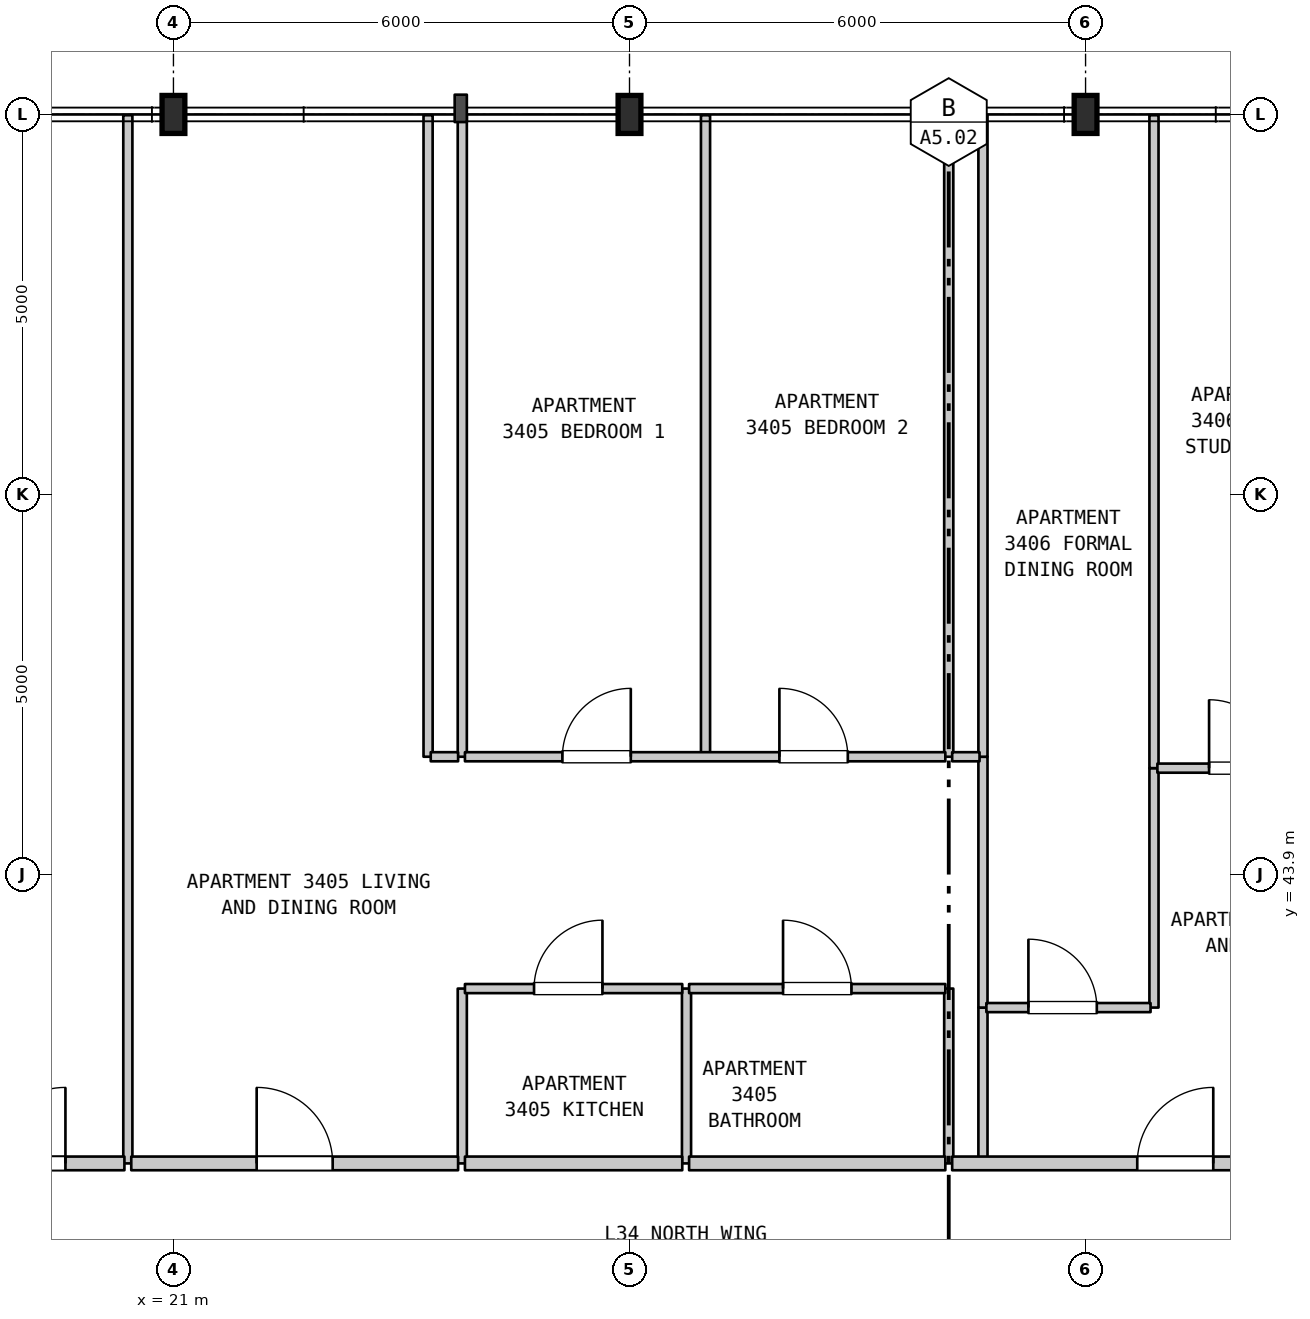
"""IFC4 building model, lengths in metres.
Left out: names, types, materials, properties, quantities, classifications, styles, units other than length and angle.
Written with IfcOpenShell. Run it as: python <this file> out.ifc"""

import sys

from ifc_helpers import new_model, si_unit, direction, frame, frame_2d, origin, origin_2d, place, context, subcontext, project, spatial, rectangle, i_section, extrude, element, fill, save


model = new_model("IFC4")
c1 = context("Model", 3, precision=1e-05, world=origin(), true_north=direction((0.0, 1.0)))
c2 = subcontext(c1, "Body", "Model", "MODEL_VIEW")
j1 = project(units=[si_unit("LENGTHUNIT", "METRE"), si_unit("PLANEANGLEUNIT", "RADIAN")], contexts=[c1])
p1 = place(None, origin())
s1 = spatial("IfcSite", under=j1, at=p1, CompositionType="ELEMENT")
p2 = place(p1, origin())
s2 = spatial("IfcBuilding", under=s1, at=p2, CompositionType="ELEMENT")
p3 = place(p2, frame((0.0, 0.0, 140.9)))
s3 = spatial("IfcBuildingStorey", under=s2, at=p3, CompositionType="ELEMENT", Elevation=140.9)
for number, where, z_axis, x_axis in (
    (1, (21.0, 53.9, 0.0), (0.0, 0.0, 1.0), (1.0, 0.0, 0.0)),
    (2, (27.0, 53.9, 0.0), (0.0, 0.0, 1.0), (1.0, 0.0, 0.0)),
    (3, (33.0, 53.9, 0.0), (0.0, 0.0, 1.0), (1.0, 0.0, 0.0)),
):
    element("IfcColumn", number, at=place(p3, frame(where, z_axis=z_axis, x_axis=x_axis)), inside=s3, PredefinedType="COLUMN", context=c2, shape_type="SweptSolid", body=[
        extrude(i_section(OverallWidth=0.3, OverallDepth=0.5, WebThickness=0.014, FlangeThickness=0.028, FilletRadius=0.027, at=origin_2d()), origin(), (0.0, 0.0, 1.0), 3.7),
    ])
p4 = place(p3, frame((20.4, 40.1, 0.0), z_axis=(0.0, 0.0, 1.0), x_axis=(0.0, 1.0, 0.0)))
e4 = element("IfcWall", 4, at=p4, inside=s3, PredefinedType="PARTITIONING", context=c2, shape_type="SweptSolid", body=[
    extrude(rectangle(XDim=13.79, YDim=0.12, at=frame_2d((6.895, 0.0))), origin(), (0.0, 0.0, 1.0), 3.385),
])
p5 = place(p3, frame((24.35, 45.45, 0.0), z_axis=(0.0, 0.0, 1.0), x_axis=(0.0, 1.0, 0.0)))
e5 = element("IfcWall", 5, at=p5, inside=s3, PredefinedType="PARTITIONING", context=c2, shape_type="SweptSolid", body=[
    extrude(rectangle(XDim=8.44, YDim=0.12, at=frame_2d((4.22, 0.0))), origin(), (0.0, 0.0, 1.0), 3.385),
])
p6 = place(p3, frame((24.8, 40.1, 0.0), z_axis=(0.0, 0.0, 1.0), x_axis=(0.0, 1.0, 0.0)))
e6 = element("IfcWall", 6, at=p6, inside=s3, PredefinedType="PARTITIONING", context=c2, shape_type="SweptSolid", body=[
    extrude(rectangle(XDim=2.3, YDim=0.12, at=frame_2d((1.15, 0.0))), origin(), (0.0, 0.0, 1.0), 3.385),
])
p7 = place(p3, frame((24.8, 45.45, 0.0), z_axis=(0.0, 0.0, 1.0), x_axis=(0.0, 1.0, 0.0)))
e7 = element("IfcWall", 7, at=p7, inside=s3, PredefinedType="PARTITIONING", context=c2, shape_type="SweptSolid", body=[
    extrude(rectangle(XDim=8.44, YDim=0.12, at=frame_2d((4.22, 0.0))), origin(), (0.0, 0.0, 1.0), 3.385),
])
p8 = place(p3, frame((27.75, 40.1, 0.0), z_axis=(0.0, 0.0, 1.0), x_axis=(0.0, 1.0, 0.0)))
e8 = element("IfcWall", 8, at=p8, inside=s3, PredefinedType="PARTITIONING", context=c2, shape_type="SweptSolid", body=[
    extrude(rectangle(XDim=2.3, YDim=0.12, at=frame_2d((1.15, 0.0))), origin(), (0.0, 0.0, 1.0), 3.385),
])
p9 = place(p3, frame((28.0, 45.45, 0.0), z_axis=(0.0, 0.0, 1.0), x_axis=(0.0, 1.0, 0.0)))
e9 = element("IfcWall", 9, at=p9, inside=s3, PredefinedType="PARTITIONING", context=c2, shape_type="SweptSolid", body=[
    extrude(rectangle(XDim=8.44, YDim=0.12, at=frame_2d((4.22, 0.0))), origin(), (0.0, 0.0, 1.0), 3.385),
])
p10 = place(p3, frame((31.2, 40.1, 0.0), z_axis=(0.0, 0.0, 1.0), x_axis=(0.0, 1.0, 0.0)))
e10 = element("IfcWall", 10, at=p10, inside=s3, PredefinedType="PARTITIONING", context=c2, shape_type="SweptSolid", body=[
    extrude(rectangle(XDim=2.3, YDim=0.12, at=frame_2d((1.15, 0.0))), origin(), (0.0, 0.0, 1.0), 3.385),
])
p11 = place(p3, frame((31.2, 45.45, 0.0), z_axis=(0.0, 0.0, 1.0), x_axis=(0.0, 1.0, 0.0)))
e11 = element("IfcWall", 11, at=p11, inside=s3, PredefinedType="PARTITIONING", context=c2, shape_type="SweptSolid", body=[
    extrude(rectangle(XDim=8.44, YDim=0.12, at=frame_2d((4.22, 0.0))), origin(), (0.0, 0.0, 1.0), 3.385),
])
p12 = place(p3, frame((31.65, 40.1, 0.0), z_axis=(0.0, 0.0, 1.0), x_axis=(0.0, 1.0, 0.0)))
e12 = element("IfcWall", 12, at=p12, inside=s3, PredefinedType="PARTITIONING", context=c2, shape_type="SweptSolid", body=[
    extrude(rectangle(XDim=2.05, YDim=0.12, at=frame_2d((1.025, 0.0))), origin(), (0.0, 0.0, 1.0), 3.385),
])
p13 = place(p3, frame((31.65, 42.15, 0.0), z_axis=(0.0, 0.0, 1.0), x_axis=(0.0, 1.0, 0.0)))
e13 = element("IfcWall", 13, at=p13, inside=s3, PredefinedType="PARTITIONING", context=c2, shape_type="SweptSolid", body=[
    extrude(rectangle(XDim=3.3, YDim=0.12, at=frame_2d((1.65, 0.0))), origin(), (0.0, 0.0, 1.0), 3.385),
])
p14 = place(p3, frame((31.65, 45.45, 0.0), z_axis=(0.0, 0.0, 1.0), x_axis=(0.0, 1.0, 0.0)))
e14 = element("IfcWall", 14, at=p14, inside=s3, PredefinedType="PARTITIONING", context=c2, shape_type="SweptSolid", body=[
    extrude(rectangle(XDim=8.44, YDim=0.12, at=frame_2d((4.22, 0.0))), origin(), (0.0, 0.0, 1.0), 3.385),
])
p15 = place(p3, frame((33.9, 42.15, 0.0), z_axis=(0.0, 0.0, 1.0), x_axis=(0.0, 1.0, 0.0)))
e15 = element("IfcWall", 15, at=p15, inside=s3, PredefinedType="PARTITIONING", context=c2, shape_type="SweptSolid", body=[
    extrude(rectangle(XDim=3.15, YDim=0.12, at=frame_2d((1.575, 0.0))), origin(), (0.0, 0.0, 1.0), 3.385),
])
p16 = place(p3, frame((33.9, 45.3, 0.0), z_axis=(0.0, 0.0, 1.0), x_axis=(0.0, 1.0, 0.0)))
e16 = element("IfcWall", 16, at=p16, inside=s3, PredefinedType="PARTITIONING", context=c2, shape_type="SweptSolid", body=[
    extrude(rectangle(XDim=8.59, YDim=0.12, at=frame_2d((4.295, 0.0))), origin(), (0.0, 0.0, 1.0), 3.385),
])
p17 = place(p3, frame((17.945, 40.1, 0.0), z_axis=(0.0, 0.0, 1.0), x_axis=(1.0, 0.0, 0.0)))
e17 = element("IfcWall", 17, at=p17, inside=s3, PredefinedType="STANDARD", context=c2, shape_type="SweptSolid", body=[
    extrude(rectangle(XDim=2.41, YDim=0.18, at=frame_2d((1.205, 0.0))), origin(), (0.0, 0.0, 1.0), 3.385),
])
p18 = place(p17, frame((0.634, 0.0, 0.0)))
e18 = element("IfcOpeningElement", 18, at=p18, cuts=e17, PredefinedType="OPENING", context=c2, shape_type="SweptSolid", body=[
    extrude(rectangle(XDim=1.0, YDim=2.15, at=frame_2d((0.5, 1.075))), frame((0.0, 0.1, 0.0), z_axis=(0.0, -1.0, 0.0), x_axis=(1.0, 0.0, 0.0)), (0.0, 0.0, 1.0), 0.2),
])
p19 = place(p3, frame((20.445, 40.1, 0.0), z_axis=(0.0, 0.0, 1.0), x_axis=(1.0, 0.0, 0.0)))
e19 = element("IfcWall", 19, at=p19, inside=s3, PredefinedType="STANDARD", context=c2, shape_type="SweptSolid", body=[
    extrude(rectangle(XDim=4.3, YDim=0.18, at=frame_2d((2.15, 0.0))), origin(), (0.0, 0.0, 1.0), 3.385),
])
p20 = place(p19, frame((1.65, 0.0, 0.0)))
e20 = element("IfcOpeningElement", 20, at=p20, cuts=e19, PredefinedType="OPENING", context=c2, shape_type="SweptSolid", body=[
    extrude(rectangle(XDim=1.0, YDim=2.15, at=frame_2d((0.5, 1.075))), frame((0.0, 0.1, 0.0), z_axis=(0.0, -1.0, 0.0), x_axis=(1.0, 0.0, 0.0)), (0.0, 0.0, 1.0), 0.2),
])
p21 = place(p3, frame((24.835, 40.1, 0.0), z_axis=(0.0, 0.0, 1.0), x_axis=(1.0, 0.0, 0.0)))
e21 = element("IfcWall", 21, at=p21, inside=s3, PredefinedType="STANDARD", context=c2, shape_type="SweptSolid", body=[
    extrude(rectangle(XDim=2.859, YDim=0.18, at=frame_2d((1.43, 0.0))), origin(), (0.0, 0.0, 1.0), 3.385),
])
p22 = place(p3, frame((27.784, 40.1, 0.0), z_axis=(0.0, 0.0, 1.0), x_axis=(1.0, 0.0, 0.0)))
e22 = element("IfcWall", 22, at=p22, inside=s3, PredefinedType="STANDARD", context=c2, shape_type="SweptSolid", body=[
    extrude(rectangle(XDim=3.371, YDim=0.18, at=frame_2d((1.686, 0.0))), origin(), (0.0, 0.0, 1.0), 3.385),
])
p23 = place(p3, frame((31.245, 40.1, 0.0), z_axis=(0.0, 0.0, 1.0), x_axis=(1.0, 0.0, 0.0)))
e23 = element("IfcWall", 23, at=p23, inside=s3, PredefinedType="STANDARD", context=c2, shape_type="SweptSolid", body=[
    extrude(rectangle(XDim=5.545, YDim=0.18, at=frame_2d((2.772, 0.0))), origin(), (0.0, 0.0, 1.0), 3.385),
])
p24 = place(p23, frame((2.435, 0.0, 0.0)))
e24 = element("IfcOpeningElement", 24, at=p24, cuts=e23, PredefinedType="OPENING", context=c2, shape_type="SweptSolid", body=[
    extrude(rectangle(XDim=1.0, YDim=2.15, at=frame_2d((0.5, 1.075))), frame((0.0, 0.1, 0.0), z_axis=(0.0, -1.0, 0.0), x_axis=(1.0, 0.0, 0.0)), (0.0, 0.0, 1.0), 0.2),
])
p25 = place(p3, frame((31.695, 42.15, 0.0), z_axis=(0.0, 0.0, 1.0), x_axis=(1.0, 0.0, 0.0)))
e25 = element("IfcWall", 25, at=p25, inside=s3, PredefinedType="PARTITIONING", context=c2, shape_type="SweptSolid", body=[
    extrude(rectangle(XDim=2.16, YDim=0.12, at=frame_2d((1.08, 0.0))), origin(), (0.0, 0.0, 1.0), 3.385),
])
p26 = place(p25, frame((0.553, 0.0, 0.0)))
e26 = element("IfcOpeningElement", 26, at=p26, cuts=e25, PredefinedType="OPENING", context=c2, shape_type="SweptSolid", body=[
    extrude(rectangle(XDim=0.9, YDim=2.15, at=frame_2d((0.45, 1.075))), frame((0.0, 0.07, 0.0), z_axis=(0.0, -1.0, 0.0), x_axis=(1.0, 0.0, 0.0)), (0.0, 0.0, 1.0), 0.14),
])
p27 = place(p3, frame((24.835, 42.4, 0.0), z_axis=(0.0, 0.0, 1.0), x_axis=(1.0, 0.0, 0.0)))
e27 = element("IfcWall", 27, at=p27, inside=s3, PredefinedType="PARTITIONING", context=c2, shape_type="SweptSolid", body=[
    extrude(rectangle(XDim=2.859, YDim=0.12, at=frame_2d((1.43, 0.0))), origin(), (0.0, 0.0, 1.0), 3.385),
])
p28 = place(p27, frame((0.909, 0.0, 0.0)))
e28 = element("IfcOpeningElement", 28, at=p28, cuts=e27, PredefinedType="OPENING", context=c2, shape_type="SweptSolid", body=[
    extrude(rectangle(XDim=0.9, YDim=2.15, at=frame_2d((0.45, 1.075))), frame((0.0, 0.07, 0.0), z_axis=(0.0, -1.0, 0.0), x_axis=(1.0, 0.0, 0.0)), (0.0, 0.0, 1.0), 0.14),
])
p29 = place(p3, frame((27.784, 42.4, 0.0), z_axis=(0.0, 0.0, 1.0), x_axis=(1.0, 0.0, 0.0)))
e29 = element("IfcWall", 29, at=p29, inside=s3, PredefinedType="PARTITIONING", context=c2, shape_type="SweptSolid", body=[
    extrude(rectangle(XDim=3.371, YDim=0.12, at=frame_2d((1.686, 0.0))), origin(), (0.0, 0.0, 1.0), 3.385),
])
p30 = place(p29, frame((1.236, 0.0, 0.0)))
e30 = element("IfcOpeningElement", 30, at=p30, cuts=e29, PredefinedType="OPENING", context=c2, shape_type="SweptSolid", body=[
    extrude(rectangle(XDim=0.9, YDim=2.1, at=frame_2d((0.45, 1.05))), frame((0.0, 0.07, 0.0), z_axis=(0.0, -1.0, 0.0), x_axis=(1.0, 0.0, 0.0)), (0.0, 0.0, 1.0), 0.14),
])
p31 = place(p3, frame((33.945, 45.3, 0.0), z_axis=(0.0, 0.0, 1.0), x_axis=(1.0, 0.0, 0.0)))
e31 = element("IfcWall", 31, at=p31, inside=s3, PredefinedType="PARTITIONING", context=c2, shape_type="SweptSolid", body=[
    extrude(rectangle(XDim=2.26, YDim=0.12, at=frame_2d((1.13, 0.0))), origin(), (0.0, 0.0, 1.0), 3.385),
])
p32 = place(p31, frame((0.68, 0.0, 0.0)))
e32 = element("IfcOpeningElement", 32, at=p32, cuts=e31, PredefinedType="OPENING", context=c2, shape_type="SweptSolid", body=[
    extrude(rectangle(XDim=0.9, YDim=2.15, at=frame_2d((0.45, 1.075))), frame((0.0, 0.07, 0.0), z_axis=(0.0, -1.0, 0.0), x_axis=(1.0, 0.0, 0.0)), (0.0, 0.0, 1.0), 0.14),
])
p33 = place(p3, frame((24.385, 45.45, 0.0), z_axis=(0.0, 0.0, 1.0), x_axis=(1.0, 0.0, 0.0)))
e33 = element("IfcWall", 33, at=p33, inside=s3, PredefinedType="PARTITIONING", context=c2, shape_type="SweptSolid", body=[
    extrude(rectangle(XDim=0.36, YDim=0.12, at=frame_2d((0.18, 0.0))), origin(), (0.0, 0.0, 1.0), 3.385),
])
p34 = place(p3, frame((24.835, 45.45, 0.0), z_axis=(0.0, 0.0, 1.0), x_axis=(1.0, 0.0, 0.0)))
e34 = element("IfcWall", 34, at=p34, inside=s3, PredefinedType="PARTITIONING", context=c2, shape_type="SweptSolid", body=[
    extrude(rectangle(XDim=6.32, YDim=0.12, at=frame_2d((3.16, 0.0))), origin(), (0.0, 0.0, 1.0), 3.385),
])
p35 = place(p34, frame((1.282, 0.0, 0.0)))
e35 = element("IfcOpeningElement", 35, at=p35, cuts=e34, PredefinedType="OPENING", context=c2, shape_type="SweptSolid", body=[
    extrude(rectangle(XDim=0.9, YDim=2.15, at=frame_2d((0.45, 1.075))), frame((0.0, 0.07, 0.0), z_axis=(0.0, -1.0, 0.0), x_axis=(1.0, 0.0, 0.0)), (0.0, 0.0, 1.0), 0.14),
])
p36 = place(p34, frame((4.137, 0.0, 0.0)))
e36 = element("IfcOpeningElement", 36, at=p36, cuts=e34, PredefinedType="OPENING", context=c2, shape_type="SweptSolid", body=[
    extrude(rectangle(XDim=0.9, YDim=2.15, at=frame_2d((0.45, 1.075))), frame((0.0, 0.07, 0.0), z_axis=(0.0, -1.0, 0.0), x_axis=(1.0, 0.0, 0.0)), (0.0, 0.0, 1.0), 0.14),
])
p37 = place(p3, frame((31.245, 45.45, 0.0), z_axis=(0.0, 0.0, 1.0), x_axis=(1.0, 0.0, 0.0)))
e37 = element("IfcWall", 37, at=p37, inside=s3, PredefinedType="PARTITIONING", context=c2, shape_type="SweptSolid", body=[
    extrude(rectangle(XDim=0.36, YDim=0.12, at=frame_2d((0.18, 0.0))), origin(), (0.0, 0.0, 1.0), 3.385),
])
p38 = place(p18, origin())
e38 = element("IfcDoor", 38, at=p38, inside=s3, OperationType="SINGLE_SWING_RIGHT", PredefinedType="DOOR", context=c2, shape_type="SweptSolid", body=[
    extrude(rectangle(XDim=1.0, YDim=2.15, at=frame_2d((0.5, 1.075))), frame((0.0, 0.025, 0.0), z_axis=(0.0, -1.0, 0.0), x_axis=(1.0, 0.0, 0.0)), (0.0, 0.0, 1.0), 0.05),
])
fill(e18, e38)
p39 = place(p20, origin())
e39 = element("IfcDoor", 39, at=p39, inside=s3, OperationType="SINGLE_SWING_LEFT", PredefinedType="DOOR", context=c2, shape_type="SweptSolid", body=[
    extrude(rectangle(XDim=1.0, YDim=2.15, at=frame_2d((0.5, 1.075))), frame((0.0, 0.025, 0.0), z_axis=(0.0, -1.0, 0.0), x_axis=(1.0, 0.0, 0.0)), (0.0, 0.0, 1.0), 0.05),
])
fill(e20, e39)
p40 = place(p24, origin())
e40 = element("IfcDoor", 40, at=p40, inside=s3, OperationType="SINGLE_SWING_RIGHT", PredefinedType="DOOR", context=c2, shape_type="SweptSolid", body=[
    extrude(rectangle(XDim=1.0, YDim=2.15, at=frame_2d((0.5, 1.075))), frame((0.0, 0.025, 0.0), z_axis=(0.0, -1.0, 0.0), x_axis=(1.0, 0.0, 0.0)), (0.0, 0.0, 1.0), 0.05),
])
fill(e24, e40)
p41 = place(p26, origin())
e41 = element("IfcDoor", 41, at=p41, inside=s3, OperationType="SINGLE_SWING_LEFT", PredefinedType="DOOR", context=c2, shape_type="SweptSolid", body=[
    extrude(rectangle(XDim=0.9, YDim=2.15, at=frame_2d((0.45, 1.075))), frame((0.0, 0.025, 0.0), z_axis=(0.0, -1.0, 0.0), x_axis=(1.0, 0.0, 0.0)), (0.0, 0.0, 1.0), 0.05),
])
fill(e26, e41)
p42 = place(p28, origin())
e42 = element("IfcDoor", 42, at=p42, inside=s3, OperationType="SINGLE_SWING_RIGHT", PredefinedType="DOOR", context=c2, shape_type="SweptSolid", body=[
    extrude(rectangle(XDim=0.9, YDim=2.15, at=frame_2d((0.45, 1.075))), frame((0.0, 0.025, 0.0), z_axis=(0.0, -1.0, 0.0), x_axis=(1.0, 0.0, 0.0)), (0.0, 0.0, 1.0), 0.05),
])
fill(e28, e42)
p43 = place(p30, origin())
e43 = element("IfcDoor", 43, at=p43, inside=s3, OperationType="SINGLE_SWING_LEFT", PredefinedType="DOOR", context=c2, shape_type="SweptSolid", body=[
    extrude(rectangle(XDim=0.9, YDim=2.1, at=frame_2d((0.45, 1.05))), frame((0.0, 0.025, 0.0), z_axis=(0.0, -1.0, 0.0), x_axis=(1.0, 0.0, 0.0)), (0.0, 0.0, 1.0), 0.05),
])
fill(e30, e43)
p44 = place(p32, origin())
e44 = element("IfcDoor", 44, at=p44, inside=s3, OperationType="SINGLE_SWING_LEFT", PredefinedType="DOOR", context=c2, shape_type="SweptSolid", body=[
    extrude(rectangle(XDim=0.9, YDim=2.15, at=frame_2d((0.45, 1.075))), frame((0.0, 0.025, 0.0), z_axis=(0.0, -1.0, 0.0), x_axis=(1.0, 0.0, 0.0)), (0.0, 0.0, 1.0), 0.05),
])
fill(e32, e44)
p45 = place(p35, origin())
e45 = element("IfcDoor", 45, at=p45, inside=s3, OperationType="SINGLE_SWING_RIGHT", PredefinedType="DOOR", context=c2, shape_type="SweptSolid", body=[
    extrude(rectangle(XDim=0.9, YDim=2.15, at=frame_2d((0.45, 1.075))), frame((0.0, 0.025, 0.0), z_axis=(0.0, -1.0, 0.0), x_axis=(1.0, 0.0, 0.0)), (0.0, 0.0, 1.0), 0.05),
])
fill(e35, e45)
p46 = place(p36, origin())
e46 = element("IfcDoor", 46, at=p46, inside=s3, OperationType="SINGLE_SWING_LEFT", PredefinedType="DOOR", context=c2, shape_type="SweptSolid", body=[
    extrude(rectangle(XDim=0.9, YDim=2.15, at=frame_2d((0.45, 1.075))), frame((0.0, 0.025, 0.0), z_axis=(0.0, -1.0, 0.0), x_axis=(1.0, 0.0, 0.0)), (0.0, 0.0, 1.0), 0.05),
])
fill(e36, e46)
save(model, sys.argv[1])
